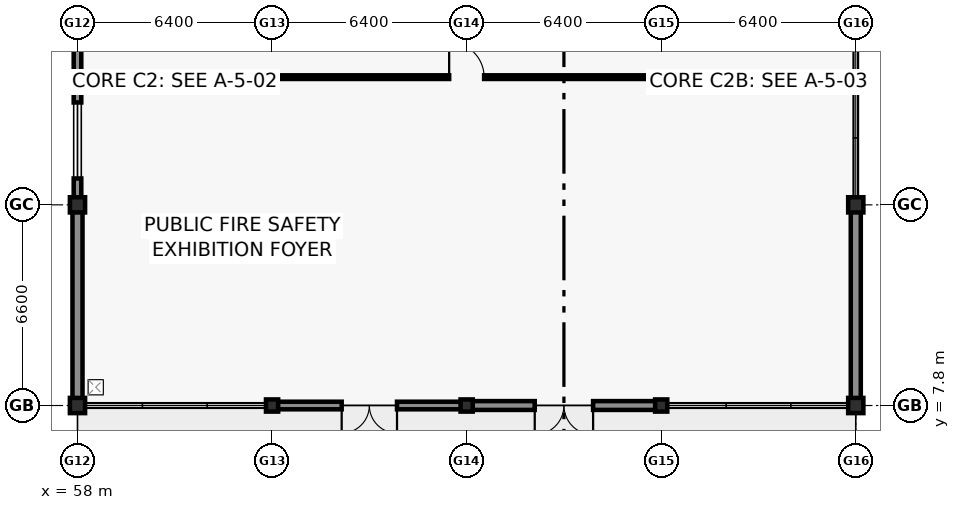
"""IFC4 building model, lengths in metres.
Left out: names, types, materials, properties, quantities, classifications, styles, units other than length and angle.
Written with IfcOpenShell. Run it as: python <this file> out.ifc"""

import sys

from ifc_helpers import new_model, si_unit, direction, frame, frame_2d, origin, origin_2d, place, context, subcontext, project, spatial, rectangle, i_section, extrude, element, fill, save


model = new_model("IFC4")
c1 = context("Model", 3, precision=1e-05, world=origin(), true_north=direction((0.0, 1.0)))
c2 = subcontext(c1, "Body", "Model", "MODEL_VIEW")
j1 = project(units=[si_unit("LENGTHUNIT", "METRE"), si_unit("PLANEANGLEUNIT", "RADIAN")], contexts=[c1])
p1 = place(None, origin())
s1 = spatial("IfcSite", under=j1, at=p1, CompositionType="ELEMENT")
p2 = place(p1, origin())
s2 = spatial("IfcBuilding", under=s1, at=p2, CompositionType="ELEMENT")
p3 = place(p2, origin())
s3 = spatial("IfcBuildingStorey", under=s2, at=p3, CompositionType="ELEMENT", Elevation=0.0)
for number, where, z_axis, x_axis in (
    (1, (58.0, 7.8, 0.0), (0.0, 0.0, 1.0), (1.0, 0.0, 0.0)),
    (2, (58.0, 14.4, 0.0), (0.0, 0.0, 1.0), (1.0, 0.0, 0.0)),
):
    element("IfcColumn", number, at=place(p3, frame(where, z_axis=z_axis, x_axis=x_axis)), inside=s3, PredefinedType="COLUMN", context=c2, shape_type="SweptSolid", body=[
        extrude(i_section(OverallWidth=0.5, OverallDepth=0.5, WebThickness=0.02, FlangeThickness=0.036, at=origin_2d()), origin(), (0.0, 0.0, 1.0), 5.4),
    ])
for number, where, z_axis, x_axis in (
    (3, (64.4, 7.8, 0.0), (0.0, 0.0, 1.0), (1.0, 0.0, 0.0)),
    (4, (70.8, 7.8, 0.0), (0.0, 0.0, 1.0), (1.0, 0.0, 0.0)),
    (5, (77.2, 7.8, 0.0), (0.0, 0.0, 1.0), (1.0, 0.0, 0.0)),
):
    element("IfcColumn", number, at=place(p3, frame(where, z_axis=z_axis, x_axis=x_axis)), inside=s3, PredefinedType="COLUMN", context=c2, shape_type="SweptSolid", body=[
        extrude(i_section(OverallWidth=0.4, OverallDepth=0.4, WebThickness=0.02, FlangeThickness=0.032, at=origin_2d()), origin(), (0.0, 0.0, 1.0), 5.4),
    ])
for number, where, z_axis, x_axis in (
    (6, (83.6, 7.8, 0.0), (0.0, 0.0, 1.0), (1.0, 0.0, 0.0)),
    (7, (83.6, 14.4, 0.0), (0.0, 0.0, 1.0), (1.0, 0.0, 0.0)),
):
    element("IfcColumn", number, at=place(p3, frame(where, z_axis=z_axis, x_axis=x_axis)), inside=s3, PredefinedType="COLUMN", context=c2, shape_type="SweptSolid", body=[
        extrude(i_section(OverallWidth=0.5, OverallDepth=0.5, WebThickness=0.02, FlangeThickness=0.036, at=origin_2d()), origin(), (0.0, 0.0, 1.0), 5.4),
    ])
p4 = place(p3, frame((70.795, 7.8, 0.0), z_axis=(0.0, 0.0, 1.0), x_axis=(-1.0, 0.0, 0.0)))
e8 = element("IfcWall", 8, at=p4, inside=s3, PredefinedType="SOLIDWALL", context=c2, shape_type="SweptSolid", body=[
    extrude(rectangle(XDim=6.39, YDim=0.25, at=frame_2d((3.195, 0.0))), origin(), (0.0, 0.0, 1.0), 4.52),
])
p5 = place(p4, frame((2.285, 0.0, 0.0)))
e9 = element("IfcOpeningElement", 9, at=p5, cuts=e8, PredefinedType="OPENING", context=c2, shape_type="SweptSolid", body=[
    extrude(rectangle(XDim=1.82, YDim=2.2, at=frame_2d((0.91, 1.1))), frame((0.0, 0.135, 0.0), z_axis=(0.0, -1.0, 0.0), x_axis=(1.0, 0.0, 0.0)), (0.0, 0.0, 1.0), 0.27),
])
p6 = place(p3, frame((77.195, 7.8, 0.0), z_axis=(0.0, 0.0, 1.0), x_axis=(-1.0, 0.0, 0.0)))
e10 = element("IfcWall", 10, at=p6, inside=s3, PredefinedType="SOLIDWALL", context=c2, shape_type="SweptSolid", body=[
    extrude(rectangle(XDim=6.39, YDim=0.29, at=frame_2d((3.195, 0.0))), origin(), (0.0, 0.0, 1.0), 4.52),
])
p7 = place(p6, frame((2.235, 0.0, 0.0)))
e11 = element("IfcOpeningElement", 11, at=p7, cuts=e10, PredefinedType="OPENING", context=c2, shape_type="SweptSolid", body=[
    extrude(rectangle(XDim=1.92, YDim=2.25, at=frame_2d((0.96, 1.125))), frame((0.0, 0.155, 0.0), z_axis=(0.0, -1.0, 0.0), x_axis=(1.0, 0.0, 0.0)), (0.0, 0.0, 1.0), 0.31),
])
for number, where, z_axis, x_axis in (
    (12, (58.0, 7.805, 0.0), (0.0, 0.0, 1.0), (0.0, 1.0, 0.0)),
    (13, (83.6, 14.395, 0.0), (0.0, 0.0, 1.0), (0.0, -1.0, 0.0)),
):
    element("IfcWall", number, at=place(p3, frame(where, z_axis=z_axis, x_axis=x_axis)), inside=s3, PredefinedType="SOLIDWALL", context=c2, shape_type="SweptSolid", body=[
        extrude(rectangle(XDim=6.59, YDim=0.33, at=frame_2d((3.295, 0.0))), origin(), (0.0, 0.0, 1.0), 4.52),
    ])
p8 = place(p3, frame((58.0, 14.405, 0.0), z_axis=(0.0, 0.0, 1.0), x_axis=(0.0, 1.0, 0.0)))
e14 = element("IfcWall", 14, at=p8, inside=s3, PredefinedType="SOLIDWALL", context=c2, shape_type="SweptSolid", body=[
    extrude(rectangle(XDim=6.59, YDim=0.25, at=frame_2d((3.295, 0.0))), origin(), (0.0, 0.0, 1.0), 4.52),
])
p9 = place(p8, frame((0.863, 0.0, 0.8)))
e15 = element("IfcOpeningElement", 15, at=p9, cuts=e14, PredefinedType="OPENING", context=c2, shape_type="SweptSolid", body=[
    extrude(rectangle(XDim=2.5, YDim=1.8, at=frame_2d((1.25, 0.9))), frame((0.0, 0.135, 0.0), z_axis=(0.0, -1.0, 0.0), x_axis=(1.0, 0.0, 0.0)), (0.0, 0.0, 1.0), 0.27),
])
p10 = place(p3, frame((58.22, 18.6, 0.0), z_axis=(0.0, 0.0, 1.0), x_axis=(1.0, 0.0, 0.0)))
e16 = element("IfcWall", 16, at=p10, inside=s3, PredefinedType="PARTITIONING", context=c2, shape_type="SweptSolid", body=[
    extrude(rectangle(XDim=25.16, YDim=0.12, at=frame_2d((12.58, 0.0))), origin(), (0.0, 0.0, 1.0), 4.5),
])
p11 = place(p10, frame((12.005, 0.0, 0.0)))
e17 = element("IfcOpeningElement", 17, at=p11, cuts=e16, PredefinedType="OPENING", context=c2, shape_type="SweptSolid", body=[
    extrude(rectangle(XDim=1.15, YDim=2.12, at=frame_2d((0.575, 1.06))), frame((0.0, 0.07, 0.0), z_axis=(0.0, -1.0, 0.0), x_axis=(1.0, 0.0, 0.0)), (0.0, 0.0, 1.0), 0.14),
])
p12 = place(p5, origin())
e18 = element("IfcDoor", 18, at=p12, inside=s3, OperationType="DOUBLE_DOOR_SINGLE_SWING", PredefinedType="DOOR", context=c2, shape_type="SweptSolid", body=[
    extrude(rectangle(XDim=1.82, YDim=2.2, at=frame_2d((0.91, 1.1))), frame((0.0, 0.025, 0.0), z_axis=(0.0, -1.0, 0.0), x_axis=(1.0, 0.0, 0.0)), (0.0, 0.0, 1.0), 0.05),
])
fill(e9, e18)
p13 = place(p7, origin())
e19 = element("IfcDoor", 19, at=p13, inside=s3, OperationType="DOUBLE_DOOR_SINGLE_SWING", PredefinedType="DOOR", context=c2, shape_type="SweptSolid", body=[
    extrude(rectangle(XDim=1.92, YDim=2.25, at=frame_2d((0.96, 1.125))), frame((0.0, 0.025, 0.0), z_axis=(0.0, -1.0, 0.0), x_axis=(1.0, 0.0, 0.0)), (0.0, 0.0, 1.0), 0.05),
])
fill(e11, e19)
p14 = place(p9, origin())
e20 = element("IfcWindow", 20, at=p14, inside=s3, PartitioningType="TRIPLE_PANEL_VERTICAL", PredefinedType="WINDOW", context=c2, shape_type="SweptSolid", body=[
    extrude(rectangle(XDim=2.5, YDim=1.8, at=frame_2d((1.25, 0.9))), frame((0.0, 0.03, 0.0), z_axis=(0.0, -1.0, 0.0), x_axis=(1.0, 0.0, 0.0)), (0.0, 0.0, 1.0), 0.06),
])
fill(e15, e20)
p15 = place(p11, origin())
e21 = element("IfcDoor", 21, at=p15, inside=s3, OperationType="SINGLE_SWING_LEFT", PredefinedType="DOOR", context=c2, shape_type="SweptSolid", body=[
    extrude(rectangle(XDim=1.15, YDim=2.12, at=frame_2d((0.575, 1.06))), frame((0.0, 0.025, 0.0), z_axis=(0.0, -1.0, 0.0), x_axis=(1.0, 0.0, 0.0)), (0.0, 0.0, 1.0), 0.05),
])
fill(e17, e21)
save(model, sys.argv[1])
